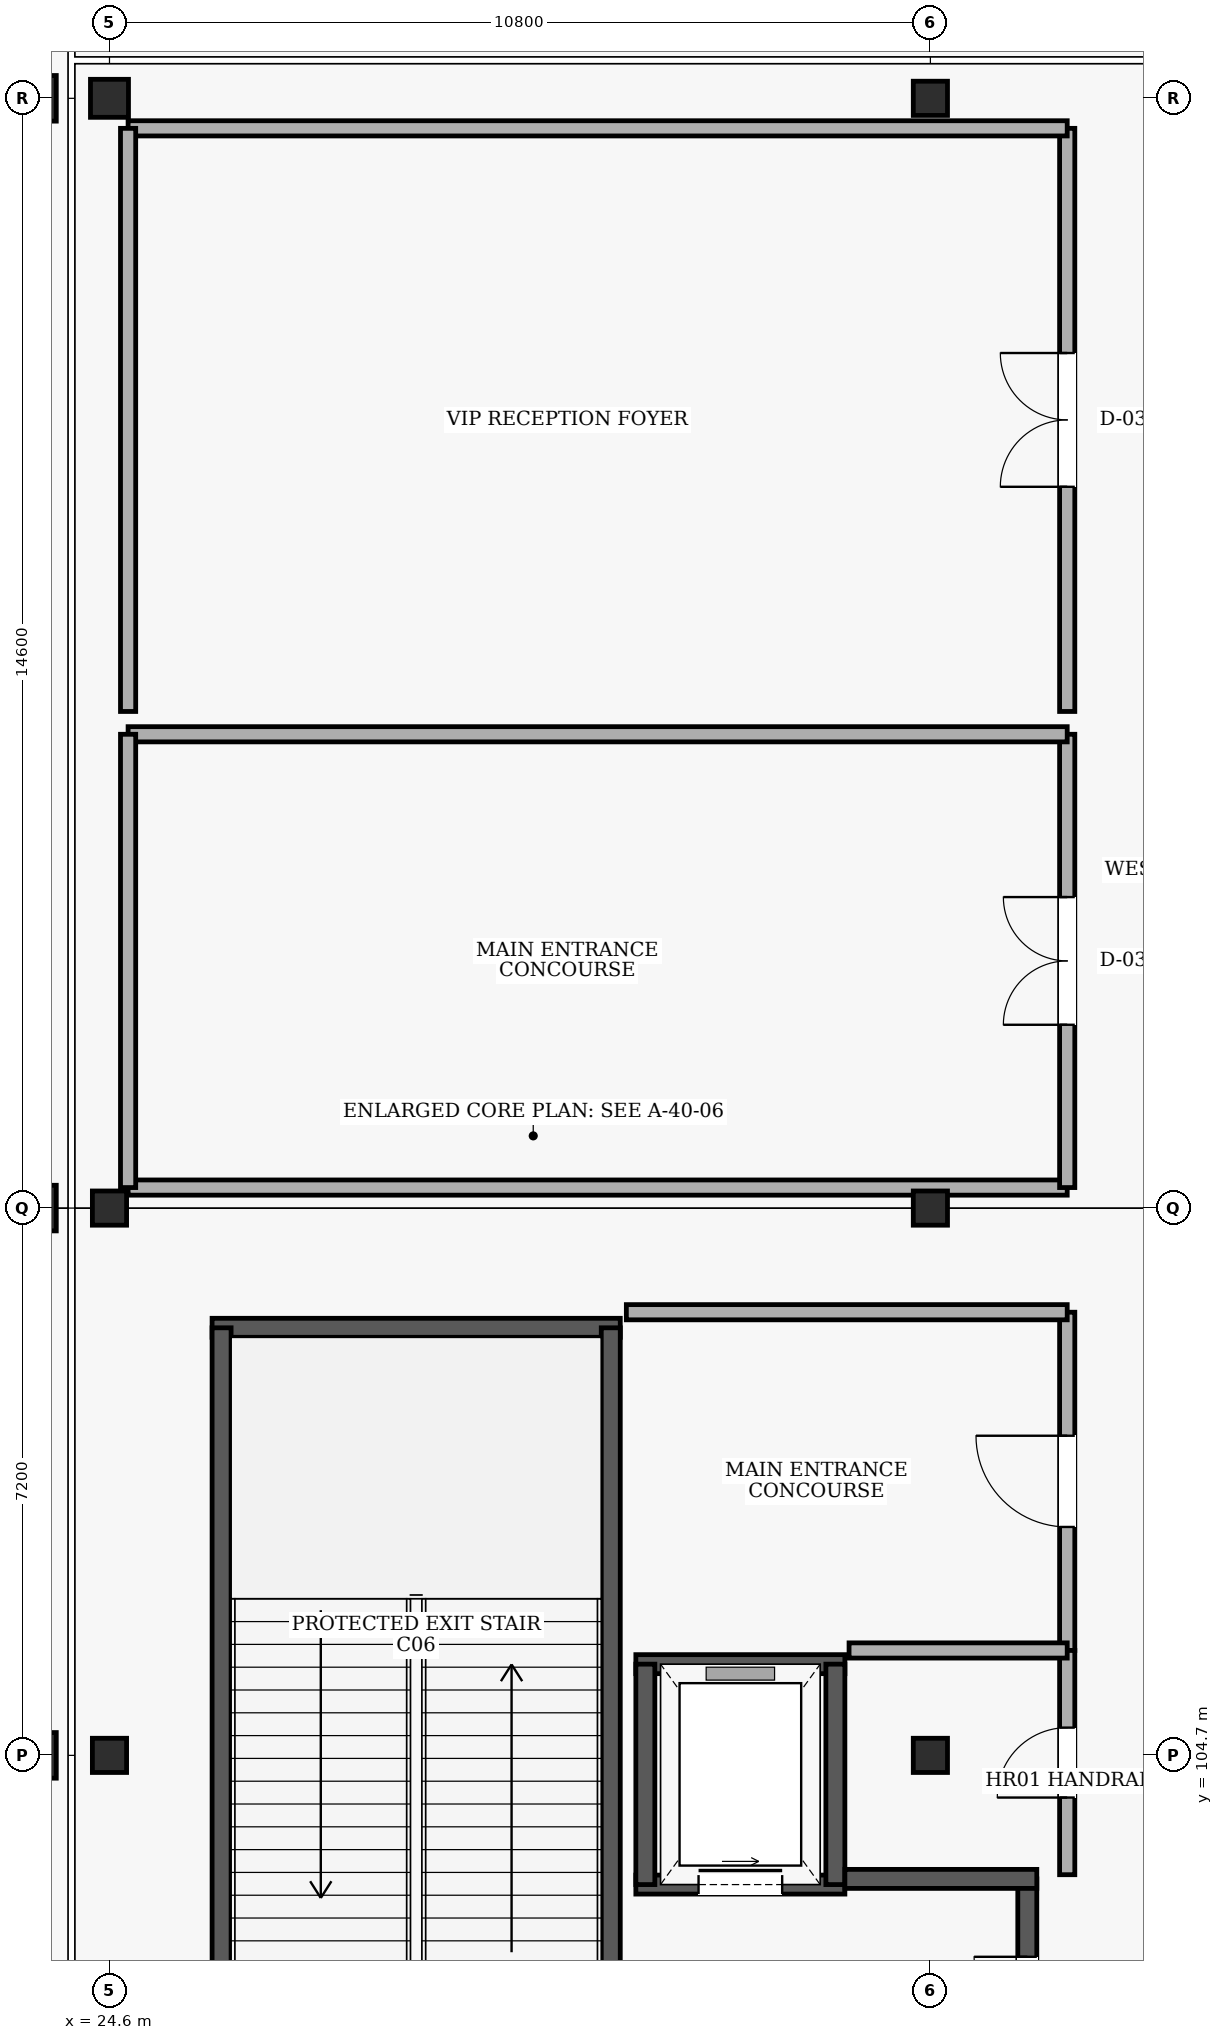
"""IFC4 building model, lengths in metres.
Left out: names, types, materials, properties, quantities, classifications, styles, units other than length and angle.
Written with IfcOpenShell. Run it as: python <this file> out.ifc"""

import sys

from ifc_helpers import new_model, si_unit, direction, frame, frame_2d, origin, origin_2d, place, context, subcontext, project, spatial, rectangle, extrude, element, fill, save


model = new_model("IFC4")
c1 = context("Model", 3, precision=1e-05, world=origin(), true_north=direction((0.0, 1.0)))
c2 = subcontext(c1, "Body", "Model", "MODEL_VIEW")
j1 = project(units=[si_unit("LENGTHUNIT", "METRE"), si_unit("PLANEANGLEUNIT", "RADIAN")], contexts=[c1])
p1 = place(None, origin())
s1 = spatial("IfcSite", under=j1, at=p1, CompositionType="ELEMENT")
p2 = place(p1, origin())
s2 = spatial("IfcBuilding", under=s1, at=p2, CompositionType="ELEMENT")
p3 = place(p2, origin())
s3 = spatial("IfcBuildingStorey", under=s2, at=p3, CompositionType="ELEMENT", Elevation=0.0)
for number, where, z_axis, x_axis in (
    (1, (23.6, 104.7, 0.0), (0.0, 0.0, 1.0), (1.0, 0.0, 0.0)),
    (2, (23.6, 111.9, 0.0), (0.0, 0.0, 1.0), (1.0, 0.0, 0.0)),
    (3, (23.6, 126.5, 0.0), (0.0, 0.0, 1.0), (1.0, 0.0, 0.0)),
):
    element("IfcColumn", number, at=place(p3, frame(where, z_axis=z_axis, x_axis=x_axis)), inside=s3, PredefinedType="COLUMN", context=c2, shape_type="SweptSolid", body=[
        extrude(rectangle(XDim=0.6, YDim=0.6, at=origin_2d()), origin(), (0.0, 0.0, 1.0), 5.4),
    ])
for number, where, z_axis, x_axis in (
    (4, (24.6, 104.7, 0.0), (0.0, 0.0, 1.0), (1.0, 0.0, 0.0)),
    (5, (24.6, 111.9, 0.0), (0.0, 0.0, 1.0), (1.0, 0.0, 0.0)),
):
    element("IfcColumn", number, at=place(p3, frame(where, z_axis=z_axis, x_axis=x_axis)), inside=s3, PredefinedType="COLUMN", context=c2, shape_type="SweptSolid", body=[
        extrude(rectangle(XDim=0.45, YDim=0.45, at=origin_2d()), origin(), (0.0, 0.0, 1.0), 5.4),
    ])
p4 = place(p3, frame((24.6, 126.5, 0.0), z_axis=(0.0, 0.0, 1.0), x_axis=(1.0, 0.0, 0.0)))
e6 = element("IfcColumn", 6, at=p4, inside=s3, PredefinedType="COLUMN", context=c2, shape_type="SweptSolid", body=[
    extrude(rectangle(XDim=0.5, YDim=0.5, at=origin_2d()), origin(), (0.0, 0.0, 1.0), 5.4),
])
for number, where, z_axis, x_axis in (
    (7, (35.4, 104.7, 0.0), (0.0, 0.0, 1.0), (1.0, 0.0, 0.0)),
    (8, (35.4, 111.9, 0.0), (0.0, 0.0, 1.0), (1.0, 0.0, 0.0)),
    (9, (35.4, 126.5, 0.0), (0.0, 0.0, 1.0), (1.0, 0.0, 0.0)),
):
    element("IfcColumn", number, at=place(p3, frame(where, z_axis=z_axis, x_axis=x_axis)), inside=s3, PredefinedType="COLUMN", context=c2, shape_type="SweptSolid", body=[
        extrude(rectangle(XDim=0.45, YDim=0.45, at=origin_2d()), origin(), (0.0, 0.0, 1.0), 5.4),
    ])
p5 = place(p3, frame((31.32, 110.325, 0.0), z_axis=(0.0, 0.0, 1.0), x_axis=(-1.0, 0.0, 0.0)))
e10 = element("IfcWall", 10, at=p5, inside=s3, PredefinedType="SHEAR", context=c2, shape_type="SweptSolid", body=[
    extrude(rectangle(XDim=5.37, YDim=0.25, at=frame_2d((2.685, 0.0))), origin(), (0.0, 0.0, 1.0), 5.08),
])
p6 = place(p3, frame((26.075, 99.475, 0.0), z_axis=(0.0, 0.0, 1.0), x_axis=(0.0, 1.0, 0.0)))
e11 = element("IfcWall", 11, at=p6, inside=s3, PredefinedType="SHEAR", context=c2, shape_type="SweptSolid", body=[
    extrude(rectangle(XDim=10.85, YDim=0.25, at=frame_2d((5.425, 0.0))), origin(), (0.0, 0.0, 1.0), 5.08),
])
p7 = place(p3, frame((31.195, 99.475, 0.0), z_axis=(0.0, 0.0, 1.0), x_axis=(0.0, 1.0, 0.0)))
e12 = element("IfcWall", 12, at=p7, inside=s3, PredefinedType="SHEAR", context=c2, shape_type="SweptSolid", body=[
    extrude(rectangle(XDim=10.85, YDim=0.25, at=frame_2d((5.425, 0.0))), origin(), (0.0, 0.0, 1.0), 5.08),
])
p8 = place(p7, frame((0.52, 0.0, 0.0)))
e13 = element("IfcOpeningElement", 13, at=p8, cuts=e12, PredefinedType="OPENING", context=c2, shape_type="SweptSolid", body=[
    extrude(rectangle(XDim=1.4, YDim=2.15, at=frame_2d((0.7, 1.075))), frame((0.0, 0.135, 0.0), z_axis=(0.0, -1.0, 0.0), x_axis=(1.0, 0.0, 0.0)), (0.0, 0.0, 1.0), 0.27),
])
p9 = place(p3, frame((31.525, 103.0, 0.0), z_axis=(0.0, 0.0, 1.0), x_axis=(1.0, 0.0, 0.0)))
e14 = element("IfcWall", 14, at=p9, inside=s3, PredefinedType="SHEAR", context=c2, shape_type="SweptSolid", body=[
    extrude(rectangle(XDim=2.75, YDim=0.25, at=frame_2d((1.375, 0.0))), origin(), (0.0, 0.0, 1.0), 5.08),
])
p10 = place(p9, frame((0.825, 0.0, 0.0)))
e15 = element("IfcOpeningElement", 15, at=p10, cuts=e14, PredefinedType="OPENING", context=c2, shape_type="SweptSolid", body=[
    extrude(rectangle(XDim=1.1, YDim=2.15, at=frame_2d((0.55, 1.075))), frame((0.0, 0.135, 0.0), z_axis=(0.0, -1.0, 0.0), x_axis=(1.0, 0.0, 0.0)), (0.0, 0.0, 1.0), 0.27),
])
p11 = place(p3, frame((34.275, 105.9, 0.0), z_axis=(0.0, 0.0, 1.0), x_axis=(-1.0, 0.0, 0.0)))
e16 = element("IfcWall", 16, at=p11, inside=s3, PredefinedType="SHEAR", context=c2, shape_type="SweptSolid", body=[
    extrude(rectangle(XDim=2.75, YDim=0.25, at=frame_2d((1.375, 0.0))), origin(), (0.0, 0.0, 1.0), 5.08),
])
for number, where, z_axis, x_axis in (
    (17, (31.65, 105.9, 0.0), (0.0, 0.0, 1.0), (0.0, -1.0, 0.0)),
    (18, (34.15, 103.0, 0.0), (0.0, 0.0, 1.0), (0.0, 1.0, 0.0)),
):
    element("IfcWall", number, at=place(p3, frame(where, z_axis=z_axis, x_axis=x_axis)), inside=s3, PredefinedType="SHEAR", context=c2, shape_type="SweptSolid", body=[
        extrude(rectangle(XDim=2.9, YDim=0.25, at=frame_2d((1.45, 0.0))), origin(), (0.0, 0.0, 1.0), 5.08),
    ])
p12 = place(p3, frame((36.675, 99.625, 0.0), z_axis=(0.0, 0.0, 1.0), x_axis=(0.0, 1.0, 0.0)))
e19 = element("IfcWall", 19, at=p12, inside=s3, PredefinedType="SHEAR", context=c2, shape_type="SweptSolid", body=[
    extrude(rectangle(XDim=3.45, YDim=0.25, at=frame_2d((1.725, 0.0))), origin(), (0.0, 0.0, 1.0), 5.08),
])
p13 = place(p12, frame((1.025, 0.0, 0.0)))
e20 = element("IfcOpeningElement", 20, at=p13, cuts=e19, PredefinedType="OPENING", context=c2, shape_type="SweptSolid", body=[
    extrude(rectangle(XDim=1.4, YDim=2.15, at=frame_2d((0.7, 1.075))), frame((0.0, 0.135, 0.0), z_axis=(0.0, -1.0, 0.0), x_axis=(1.0, 0.0, 0.0)), (0.0, 0.0, 1.0), 0.27),
])
p14 = place(p3, frame((34.275, 103.075, 0.0), z_axis=(0.0, 0.0, 1.0), x_axis=(1.0, 0.0, 0.0)))
e21 = element("IfcWall", 21, at=p14, inside=s3, PredefinedType="SHEAR", context=c2, shape_type="SweptSolid", body=[
    extrude(rectangle(XDim=2.525, YDim=0.25, at=frame_2d((1.263, 0.0))), origin(), (0.0, 0.0, 1.0), 5.08),
])
p15 = place(p3, frame((37.2, 106.08, 0.0), z_axis=(0.0, 0.0, 1.0), x_axis=(0.0, 1.0, 0.0)))
e22 = element("IfcWall", 22, at=p15, inside=s3, PredefinedType="PARTITIONING", context=c2, shape_type="SweptSolid", body=[
    extrude(rectangle(XDim=4.45, YDim=0.2, at=frame_2d((2.225, 0.0))), origin(), (0.0, 0.0, 1.0), 5.08),
])
p16 = place(p15, frame((1.625, 0.0, 0.0)))
e23 = element("IfcOpeningElement", 23, at=p16, cuts=e22, PredefinedType="OPENING", context=c2, shape_type="SweptSolid", body=[
    extrude(rectangle(XDim=1.2, YDim=2.15, at=frame_2d((0.6, 1.075))), frame((0.0, 0.11, 0.0), z_axis=(0.0, -1.0, 0.0), x_axis=(1.0, 0.0, 0.0)), (0.0, 0.0, 1.0), 0.22),
])
p17 = place(p3, frame((37.2, 110.53, 0.0), z_axis=(0.0, 0.0, 1.0), x_axis=(-1.0, 0.0, 0.0)))
e24 = element("IfcWall", 24, at=p17, inside=s3, PredefinedType="PARTITIONING", context=c2, shape_type="SweptSolid", body=[
    extrude(rectangle(XDim=5.8, YDim=0.2, at=frame_2d((2.9, 0.0))), origin(), (0.0, 0.0, 1.0), 5.08),
])
p18 = place(p3, frame((37.2, 103.13, 0.0), z_axis=(0.0, 0.0, 1.0), x_axis=(0.0, 1.0, 0.0)))
e25 = element("IfcWall", 25, at=p18, inside=s3, PredefinedType="PARTITIONING", context=c2, shape_type="SweptSolid", body=[
    extrude(rectangle(XDim=2.95, YDim=0.2, at=frame_2d((1.475, 0.0))), origin(), (0.0, 0.0, 1.0), 5.08),
])
p19 = place(p18, frame((1.015, 0.0, 0.0)))
e26 = element("IfcOpeningElement", 26, at=p19, cuts=e25, PredefinedType="OPENING", context=c2, shape_type="SweptSolid", body=[
    extrude(rectangle(XDim=0.92, YDim=2.1, at=frame_2d((0.46, 1.05))), frame((0.0, 0.11, 0.0), z_axis=(0.0, -1.0, 0.0), x_axis=(1.0, 0.0, 0.0)), (0.0, 0.0, 1.0), 0.22),
])
p20 = place(p3, frame((37.2, 106.08, 0.0), z_axis=(0.0, 0.0, 1.0), x_axis=(-1.0, 0.0, 0.0)))
e27 = element("IfcWall", 27, at=p20, inside=s3, PredefinedType="PARTITIONING", context=c2, shape_type="SweptSolid", body=[
    extrude(rectangle(XDim=2.87, YDim=0.2, at=frame_2d((1.435, 0.0))), origin(), (0.0, 0.0, 1.0), 5.08),
])
p21 = place(p3, frame((24.845, 112.17, 0.0), z_axis=(0.0, 0.0, 1.0), x_axis=(1.0, 0.0, 0.0)))
e28 = element("IfcWall", 28, at=p21, inside=s3, PredefinedType="PARTITIONING", context=c2, shape_type="SweptSolid", body=[
    extrude(rectangle(XDim=12.355, YDim=0.2, at=frame_2d((6.177, 0.0))), origin(), (0.0, 0.0, 1.0), 4.26),
])
p22 = place(p3, frame((37.2, 112.17, 0.0), z_axis=(0.0, 0.0, 1.0), x_axis=(0.0, 1.0, 0.0)))
e29 = element("IfcWall", 29, at=p22, inside=s3, PredefinedType="PARTITIONING", context=c2, shape_type="SweptSolid", body=[
    extrude(rectangle(XDim=5.963, YDim=0.2, at=frame_2d((2.982, 0.0))), origin(), (0.0, 0.0, 1.0), 5.08),
])
p23 = place(p22, frame((2.142, 0.0, 0.0)))
e30 = element("IfcOpeningElement", 30, at=p23, cuts=e29, PredefinedType="OPENING", context=c2, shape_type="SweptSolid", body=[
    extrude(rectangle(XDim=1.68, YDim=2.25, at=frame_2d((0.84, 1.125))), frame((0.0, 0.11, 0.0), z_axis=(0.0, -1.0, 0.0), x_axis=(1.0, 0.0, 0.0)), (0.0, 0.0, 1.0), 0.22),
])
p24 = place(p3, frame((37.2, 118.133, 0.0), z_axis=(0.0, 0.0, 1.0), x_axis=(-1.0, 0.0, 0.0)))
e31 = element("IfcWall", 31, at=p24, inside=s3, PredefinedType="PARTITIONING", context=c2, shape_type="SweptSolid", body=[
    extrude(rectangle(XDim=12.355, YDim=0.2, at=frame_2d((6.177, 0.0))), origin(), (0.0, 0.0, 1.0), 5.08),
])
p25 = place(p3, frame((24.845, 118.133, 0.0), z_axis=(0.0, 0.0, 1.0), x_axis=(0.0, -1.0, 0.0)))
e32 = element("IfcWall", 32, at=p25, inside=s3, PredefinedType="PARTITIONING", context=c2, shape_type="SweptSolid", body=[
    extrude(rectangle(XDim=5.963, YDim=0.2, at=frame_2d((2.982, 0.0))), origin(), (0.0, 0.0, 1.0), 4.16),
])
p26 = place(p3, frame((37.2, 118.433, 0.0), z_axis=(0.0, 0.0, 1.0), x_axis=(0.0, 1.0, 0.0)))
e33 = element("IfcWall", 33, at=p26, inside=s3, PredefinedType="PARTITIONING", context=c2, shape_type="SweptSolid", body=[
    extrude(rectangle(XDim=7.672, YDim=0.2, at=frame_2d((3.836, 0.0))), origin(), (0.0, 0.0, 1.0), 5.08),
])
p27 = place(p26, frame((2.956, 0.0, 0.0)))
e34 = element("IfcOpeningElement", 34, at=p27, cuts=e33, PredefinedType="OPENING", context=c2, shape_type="SweptSolid", body=[
    extrude(rectangle(XDim=1.76, YDim=2.25, at=frame_2d((0.88, 1.125))), frame((0.0, 0.11, 0.0), z_axis=(0.0, -1.0, 0.0), x_axis=(1.0, 0.0, 0.0)), (0.0, 0.0, 1.0), 0.22),
])
p28 = place(p3, frame((37.2, 126.105, 0.0), z_axis=(0.0, 0.0, 1.0), x_axis=(-1.0, 0.0, 0.0)))
e35 = element("IfcWall", 35, at=p28, inside=s3, PredefinedType="PARTITIONING", context=c2, shape_type="SweptSolid", body=[
    extrude(rectangle(XDim=12.355, YDim=0.2, at=frame_2d((6.177, 0.0))), origin(), (0.0, 0.0, 1.0), 4.26),
])
p29 = place(p3, frame((24.845, 126.105, 0.0), z_axis=(0.0, 0.0, 1.0), x_axis=(0.0, -1.0, 0.0)))
e36 = element("IfcWall", 36, at=p29, inside=s3, PredefinedType="PARTITIONING", context=c2, shape_type="SweptSolid", body=[
    extrude(rectangle(XDim=7.672, YDim=0.2, at=frame_2d((3.836, 0.0))), origin(), (0.0, 0.0, 1.0), 4.16),
])
p30 = place(p10, origin())
e37 = element("IfcDoor", 37, at=p30, inside=s3, OperationType="SLIDING_TO_LEFT", PredefinedType="DOOR", context=c2, shape_type="SweptSolid", body=[
    extrude(rectangle(XDim=1.1, YDim=2.15, at=frame_2d((0.55, 1.075))), frame((0.0, 0.025, 0.0), z_axis=(0.0, -1.0, 0.0), x_axis=(1.0, 0.0, 0.0)), (0.0, 0.0, 1.0), 0.05),
])
fill(e15, e37)
p31 = place(p13, origin())
e38 = element("IfcDoor", 38, at=p31, inside=s3, OperationType="DOUBLE_DOOR_SINGLE_SWING", PredefinedType="DOOR", context=c2, shape_type="SweptSolid", body=[
    extrude(rectangle(XDim=1.4, YDim=2.15, at=frame_2d((0.7, 1.075))), frame((0.0, 0.025, 0.0), z_axis=(0.0, -1.0, 0.0), x_axis=(1.0, 0.0, 0.0)), (0.0, 0.0, 1.0), 0.05),
])
fill(e20, e38)
p32 = place(p16, origin())
e39 = element("IfcDoor", 39, at=p32, inside=s3, OperationType="SINGLE_SWING_RIGHT", PredefinedType="DOOR", context=c2, shape_type="SweptSolid", body=[
    extrude(rectangle(XDim=1.2, YDim=2.15, at=frame_2d((0.6, 1.075))), frame((0.0, 0.025, 0.0), z_axis=(0.0, -1.0, 0.0), x_axis=(1.0, 0.0, 0.0)), (0.0, 0.0, 1.0), 0.05),
])
fill(e23, e39)
p33 = place(p19, origin())
e40 = element("IfcDoor", 40, at=p33, inside=s3, OperationType="SINGLE_SWING_LEFT", PredefinedType="DOOR", context=c2, shape_type="SweptSolid", body=[
    extrude(rectangle(XDim=0.92, YDim=2.1, at=frame_2d((0.46, 1.05))), frame((0.0, 0.025, 0.0), z_axis=(0.0, -1.0, 0.0), x_axis=(1.0, 0.0, 0.0)), (0.0, 0.0, 1.0), 0.05),
])
fill(e26, e40)
p34 = place(p23, origin())
e41 = element("IfcDoor", 41, at=p34, inside=s3, OperationType="DOUBLE_DOOR_SINGLE_SWING", PredefinedType="DOOR", context=c2, shape_type="SweptSolid", body=[
    extrude(rectangle(XDim=1.68, YDim=2.25, at=frame_2d((0.84, 1.125))), frame((0.0, 0.025, 0.0), z_axis=(0.0, -1.0, 0.0), x_axis=(1.0, 0.0, 0.0)), (0.0, 0.0, 1.0), 0.05),
])
fill(e30, e41)
p35 = place(p27, origin())
e42 = element("IfcDoor", 42, at=p35, inside=s3, OperationType="DOUBLE_DOOR_SINGLE_SWING", PredefinedType="DOOR", context=c2, shape_type="SweptSolid", body=[
    extrude(rectangle(XDim=1.76, YDim=2.25, at=frame_2d((0.88, 1.125))), frame((0.0, 0.025, 0.0), z_axis=(0.0, -1.0, 0.0), x_axis=(1.0, 0.0, 0.0)), (0.0, 0.0, 1.0), 0.05),
])
fill(e34, e42)
save(model, sys.argv[1])
